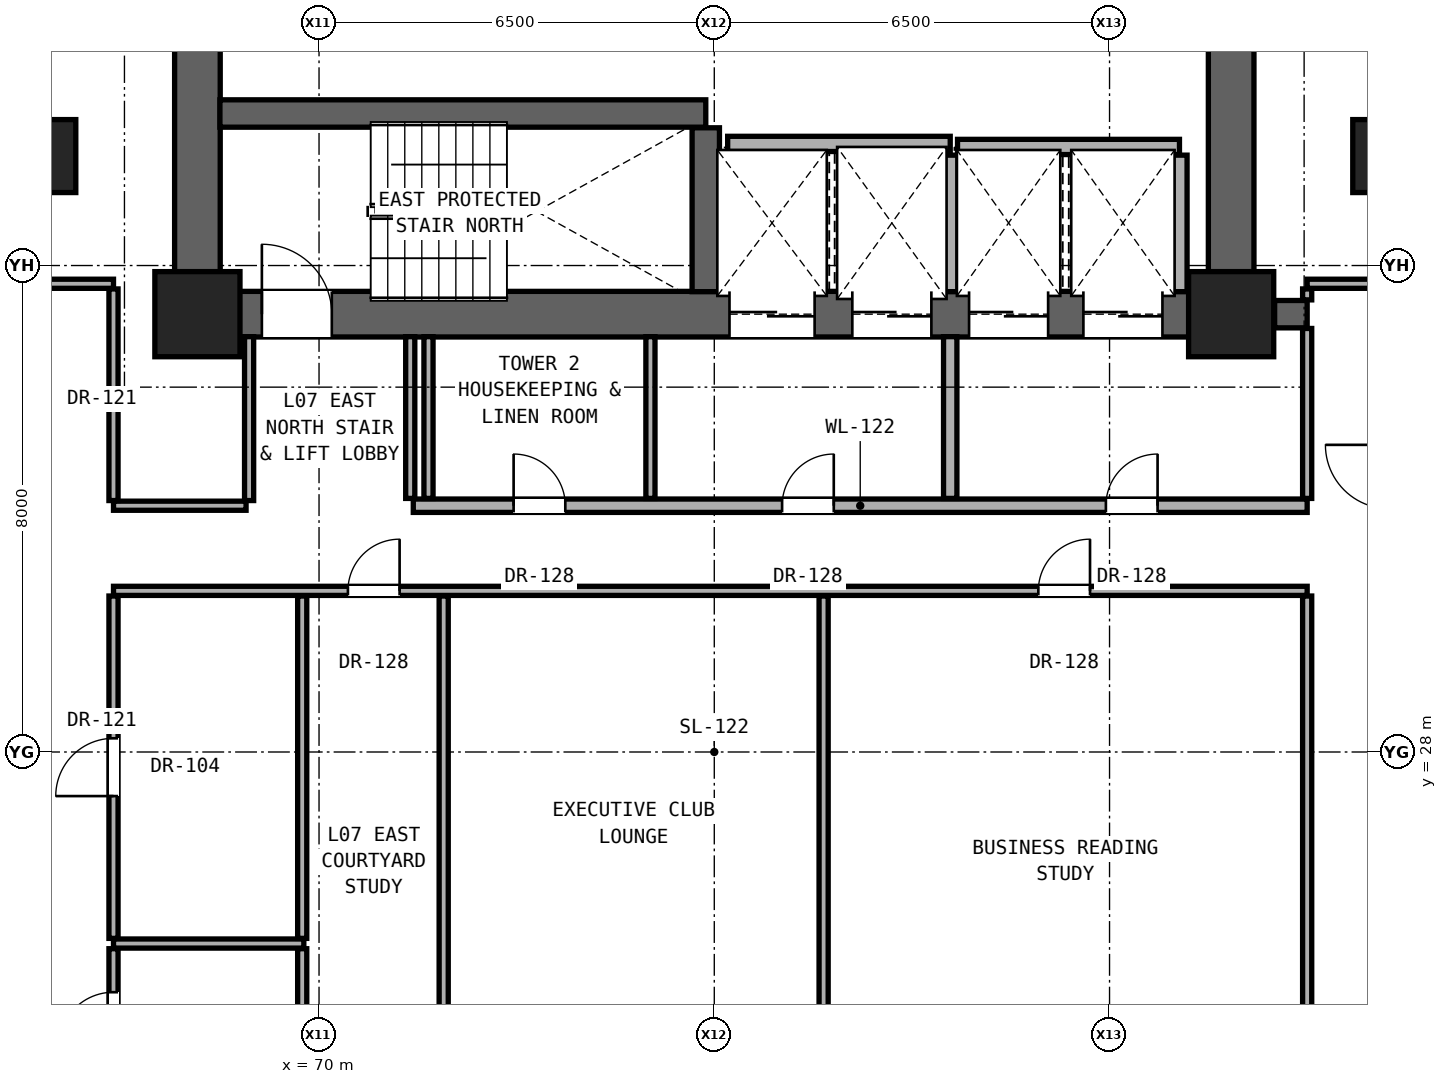
"""IFC4 building model, lengths in metres.
Left out: names, types, materials, properties, quantities, classifications, styles, units other than length and angle.
Written with IfcOpenShell. Run it as: python <this file> out.ifc"""

import sys

from ifc_helpers import new_model, si_unit, direction, frame, frame_2d, origin, origin_2d, place, context, subcontext, project, spatial, rectangle, extrude, element, fill, save


model = new_model("IFC4")
c1 = context("Model", 3, precision=1e-05, world=origin(), true_north=direction((0.0, 1.0)))
c2 = subcontext(c1, "Body", "Model", "MODEL_VIEW")
j1 = project(units=[si_unit("LENGTHUNIT", "METRE"), si_unit("PLANEANGLEUNIT", "RADIAN")], contexts=[c1])
p1 = place(None, origin())
s1 = spatial("IfcSite", under=j1, at=p1, CompositionType="ELEMENT")
p2 = place(p1, origin())
s2 = spatial("IfcBuilding", under=s1, at=p2, CompositionType="ELEMENT")
p3 = place(p2, frame((0.0, 0.0, 29.0)))
s3 = spatial("IfcBuildingStorey", under=s2, at=p3, CompositionType="ELEMENT", Elevation=29.0)
for number, where, z_axis, x_axis in (
    (1, (68.0, 35.2, 0.0), (0.0, 0.0, 1.0), (1.0, 0.0, 0.0)),
    (2, (85.0, 35.2, 0.0), (0.0, 0.0, 1.0), (1.0, 0.0, 0.0)),
):
    element("IfcColumn", number, at=place(p3, frame(where, z_axis=z_axis, x_axis=x_axis)), inside=s3, PredefinedType="COLUMN", context=c2, shape_type="SweptSolid", body=[
        extrude(rectangle(XDim=1.4, YDim=1.4, at=origin_2d()), origin(), (0.0, 0.0, 1.0), 3.3),
    ])
for number, where, z_axis, x_axis in (
    (3, (65.6, 37.8, 0.0), (0.0, 0.0, 1.0), (1.0, 0.0, 0.0)),
    (4, (87.4, 37.8, 0.0), (0.0, 0.0, 1.0), (1.0, 0.0, 0.0)),
):
    element("IfcColumn", number, at=place(p3, frame(where, z_axis=z_axis, x_axis=x_axis)), inside=s3, PredefinedType="PILASTER", context=c2, shape_type="SweptSolid", body=[
        extrude(rectangle(XDim=0.8, YDim=1.2, at=origin_2d()), origin(), (0.0, 0.0, 1.0), 3.3),
    ])
for number, where, z_axis, x_axis in (
    (5, (68.0, 35.2, 0.0), (0.0, 0.0, 1.0), (0.0, 1.0, 0.0)),
    (6, (85.0, 35.2, 0.0), (0.0, 0.0, 1.0), (0.0, 1.0, 0.0)),
):
    element("IfcWall", number, at=place(p3, frame(where, z_axis=z_axis, x_axis=x_axis)), inside=s3, PredefinedType="SHEAR", context=c2, shape_type="SweptSolid", body=[
        extrude(rectangle(XDim=5.6, YDim=0.75, at=frame_2d((2.8, 0.0))), origin(), (0.0, 0.0, 1.0), 3.06),
    ])
p4 = place(p3, frame((68.0, 35.2, 0.0), z_axis=(0.0, 0.0, 1.0), x_axis=(1.0, 0.0, 0.0)))
e7 = element("IfcWall", 7, at=p4, inside=s3, PredefinedType="SHEAR", context=c2, shape_type="SweptSolid", body=[
    extrude(rectangle(XDim=17.0, YDim=0.75, at=frame_2d((8.5, 0.0))), origin(), (0.0, 0.0, 1.0), 3.06),
])
p5 = place(p4, frame((1.06, 0.0, 0.0)))
e8 = element("IfcOpeningElement", 8, at=p5, cuts=e7, PredefinedType="OPENING", context=c2, shape_type="SweptSolid", body=[
    extrude(rectangle(XDim=1.15, YDim=2.2, at=frame_2d((0.575, 1.1))), frame((0.0, 0.385, 0.0), z_axis=(0.0, -1.0, 0.0), x_axis=(1.0, 0.0, 0.0)), (0.0, 0.0, 1.0), 0.77),
])
p6 = place(p4, frame((8.75, 0.0, 0.0)))
e9 = element("IfcOpeningElement", 9, at=p6, cuts=e7, PredefinedType="OPENING", context=c2, shape_type="SweptSolid", body=[
    extrude(rectangle(XDim=1.4, YDim=2.35, at=frame_2d((0.7, 1.175))), frame((0.0, 0.385, 0.0), z_axis=(0.0, -1.0, 0.0), x_axis=(1.0, 0.0, 0.0)), (0.0, 0.0, 1.0), 0.77),
])
p7 = place(p4, frame((10.77, 0.0, 0.0)))
e10 = element("IfcOpeningElement", 10, at=p7, cuts=e7, PredefinedType="OPENING", context=c2, shape_type="SweptSolid", body=[
    extrude(rectangle(XDim=1.3, YDim=2.3, at=frame_2d((0.65, 1.15))), frame((0.0, 0.385, 0.0), z_axis=(0.0, -1.0, 0.0), x_axis=(1.0, 0.0, 0.0)), (0.0, 0.0, 1.0), 0.77),
])
p8 = place(p4, frame((12.69, 0.0, 0.0)))
e11 = element("IfcOpeningElement", 11, at=p8, cuts=e7, PredefinedType="OPENING", context=c2, shape_type="SweptSolid", body=[
    extrude(rectangle(XDim=1.3, YDim=2.3, at=frame_2d((0.65, 1.15))), frame((0.0, 0.385, 0.0), z_axis=(0.0, -1.0, 0.0), x_axis=(1.0, 0.0, 0.0)), (0.0, 0.0, 1.0), 0.77),
])
p9 = place(p4, frame((14.57, 0.0, 0.0)))
e12 = element("IfcOpeningElement", 12, at=p9, cuts=e7, PredefinedType="OPENING", context=c2, shape_type="SweptSolid", body=[
    extrude(rectangle(XDim=1.3, YDim=2.3, at=frame_2d((0.65, 1.15))), frame((0.0, 0.385, 0.0), z_axis=(0.0, -1.0, 0.0), x_axis=(1.0, 0.0, 0.0)), (0.0, 0.0, 1.0), 0.77),
])
p10 = place(p3, frame((66.62, 24.85, 0.0), z_axis=(0.0, 0.0, 1.0), x_axis=(1.0, 0.0, 0.0)))
e13 = element("IfcWall", 13, at=p10, inside=s3, PredefinedType="PARTITIONING", context=c2, shape_type="SweptSolid", body=[
    extrude(rectangle(XDim=3.13, YDim=0.15, at=frame_2d((1.565, 0.0))), origin(), (0.0, 0.0, 1.0), 2.125),
])
p11 = place(p3, frame((66.62, 30.65, 0.0), z_axis=(0.0, 0.0, 1.0), x_axis=(1.0, 0.0, 0.0)))
e14 = element("IfcWall", 14, at=p11, inside=s3, PredefinedType="PARTITIONING", context=c2, shape_type="SweptSolid", body=[
    extrude(rectangle(XDim=19.63, YDim=0.15, at=frame_2d((9.815, 0.0))), origin(), (0.0, 0.0, 1.0), 2.125),
])
p12 = place(p11, frame((3.855, 0.0, 0.0)))
e15 = element("IfcOpeningElement", 15, at=p12, cuts=e14, PredefinedType="OPENING", context=c2, shape_type="SweptSolid", body=[
    extrude(rectangle(XDim=0.85, YDim=2.01, at=frame_2d((0.425, 1.005))), frame((0.0, 0.085, 0.0), z_axis=(0.0, -1.0, 0.0), x_axis=(1.0, 0.0, 0.0)), (0.0, 0.0, 1.0), 0.17),
])
p13 = place(p11, frame((15.209, 0.0, 0.0)))
e16 = element("IfcOpeningElement", 16, at=p13, cuts=e14, PredefinedType="OPENING", context=c2, shape_type="SweptSolid", body=[
    extrude(rectangle(XDim=0.85, YDim=2.01, at=frame_2d((0.425, 1.005))), frame((0.0, 0.085, 0.0), z_axis=(0.0, -1.0, 0.0), x_axis=(1.0, 0.0, 0.0)), (0.0, 0.0, 1.0), 0.17),
])
p14 = place(p3, frame((66.62, 32.05, 0.0), z_axis=(0.0, 0.0, 1.0), x_axis=(1.0, 0.0, 0.0)))
e17 = element("IfcWall", 17, at=p14, inside=s3, PredefinedType="PARTITIONING", context=c2, shape_type="SweptSolid", body=[
    extrude(rectangle(XDim=2.18, YDim=0.15, at=frame_2d((1.09, 0.0))), origin(), (0.0, 0.0, 1.0), 2.125),
])
p15 = place(p3, frame((71.55, 32.05, 0.0), z_axis=(0.0, 0.0, 1.0), x_axis=(1.0, 0.0, 0.0)))
e18 = element("IfcWall", 18, at=p15, inside=s3, PredefinedType="SOLIDWALL", context=c2, shape_type="SweptSolid", body=[
    extrude(rectangle(XDim=14.7, YDim=0.22, at=frame_2d((7.35, 0.0))), origin(), (0.0, 0.0, 1.0), 2.125),
])
p16 = place(p15, frame((11.39, 0.0, 0.0)))
e19 = element("IfcOpeningElement", 19, at=p16, cuts=e18, PredefinedType="OPENING", context=c2, shape_type="SweptSolid", body=[
    extrude(rectangle(XDim=0.85, YDim=2.01, at=frame_2d((0.425, 1.005))), frame((0.0, 0.12, 0.0), z_axis=(0.0, -1.0, 0.0), x_axis=(1.0, 0.0, 0.0)), (0.0, 0.0, 1.0), 0.24),
])
p17 = place(p15, frame((6.065, 0.0, 0.0)))
e20 = element("IfcOpeningElement", 20, at=p17, cuts=e18, PredefinedType="OPENING", context=c2, shape_type="SweptSolid", body=[
    extrude(rectangle(XDim=0.85, YDim=2.01, at=frame_2d((0.425, 1.005))), frame((0.0, 0.12, 0.0), z_axis=(0.0, -1.0, 0.0), x_axis=(1.0, 0.0, 0.0)), (0.0, 0.0, 1.0), 0.24),
])
p18 = place(p15, frame((1.65, 0.0, 0.0)))
e21 = element("IfcOpeningElement", 21, at=p18, cuts=e18, PredefinedType="OPENING", context=c2, shape_type="SweptSolid", body=[
    extrude(rectangle(XDim=0.85, YDim=2.01, at=frame_2d((0.425, 1.005))), frame((0.0, 0.12, 0.0), z_axis=(0.0, -1.0, 0.0), x_axis=(1.0, 0.0, 0.0)), (0.0, 0.0, 1.0), 0.24),
])
p19 = place(p3, frame((85.715, 35.2, 0.0), z_axis=(0.0, 0.0, 1.0), x_axis=(1.0, 0.0, 0.0)))
e22 = element("IfcWall", 22, at=p19, inside=s3, PredefinedType="SHEAR", context=c2, shape_type="SweptSolid", body=[
    extrude(rectangle(XDim=0.535, YDim=0.45, at=frame_2d((0.268, 0.0))), origin(), (0.0, 0.0, 1.0), 3.06),
])
p20 = place(p3, frame((65.25, 35.7, 0.0), z_axis=(0.0, 0.0, 1.0), x_axis=(1.0, 0.0, 0.0)))
e23 = element("IfcWall", 23, at=p20, inside=s3, PredefinedType="PARTITIONING", context=c2, shape_type="SweptSolid", body=[
    extrude(rectangle(XDim=1.37, YDim=0.15, at=frame_2d((0.685, 0.0))), origin(), (0.0, 0.0, 1.0), 3.06),
])
p21 = place(p3, frame((86.25, 35.7, 0.0), z_axis=(0.0, 0.0, 1.0), x_axis=(1.0, 0.0, 0.0)))
e24 = element("IfcWall", 24, at=p21, inside=s3, PredefinedType="PARTITIONING", context=c2, shape_type="SweptSolid", body=[
    extrude(rectangle(XDim=1.35, YDim=0.15, at=frame_2d((0.675, 0.0))), origin(), (0.0, 0.0, 1.0), 3.06),
])
p22 = place(p3, frame((80.5, 37.95, 0.0), z_axis=(0.0, 0.0, 1.0), x_axis=(1.0, 0.0, 0.0)))
e25 = element("IfcWall", 25, at=p22, inside=s3, PredefinedType="SOLIDWALL", context=c2, shape_type="SweptSolid", body=[
    extrude(rectangle(XDim=3.65, YDim=0.25, at=frame_2d((1.825, 0.0))), origin(), (0.0, 0.0, 1.0), 3.06),
])
p23 = place(p3, frame((76.72, 38.0, 0.0), z_axis=(0.0, 0.0, 1.0), x_axis=(1.0, 0.0, 0.0)))
e26 = element("IfcWall", 26, at=p23, inside=s3, PredefinedType="SOLIDWALL", context=c2, shape_type="SweptSolid", body=[
    extrude(rectangle(XDim=3.66, YDim=0.25, at=frame_2d((1.83, 0.0))), origin(), (0.0, 0.0, 1.0), 3.06),
])
p24 = place(p3, frame((68.37, 38.5, 0.0), z_axis=(0.0, 0.0, 1.0), x_axis=(1.0, 0.0, 0.0)))
e27 = element("IfcWall", 27, at=p24, inside=s3, PredefinedType="SHEAR", context=c2, shape_type="SweptSolid", body=[
    extrude(rectangle(XDim=7.99, YDim=0.45, at=frame_2d((3.995, 0.0))), origin(), (0.0, 0.0, 1.0), 3.06),
])
p25 = place(p3, frame((66.62, 22.435, 0.0), z_axis=(0.0, 0.0, 1.0), x_axis=(0.0, 1.0, 0.0)))
e28 = element("IfcWall", 28, at=p25, inside=s3, PredefinedType="PARTITIONING", context=c2, shape_type="SweptSolid", body=[
    extrude(rectangle(XDim=2.33, YDim=0.15, at=frame_2d((1.165, 0.0))), origin(), (0.0, 0.0, 1.0), 3.06),
])
p26 = place(p25, frame((0.715, 0.0, 0.0)))
e29 = element("IfcOpeningElement", 29, at=p26, cuts=e28, PredefinedType="OPENING", context=c2, shape_type="SweptSolid", body=[
    extrude(rectangle(XDim=0.9, YDim=2.1, at=frame_2d((0.45, 1.05))), frame((0.0, 0.085, 0.0), z_axis=(0.0, -1.0, 0.0), x_axis=(1.0, 0.0, 0.0)), (0.0, 0.0, 1.0), 0.17),
])
p27 = place(p3, frame((66.62, 24.935, 0.0), z_axis=(0.0, 0.0, 1.0), x_axis=(0.0, 1.0, 0.0)))
e30 = element("IfcWall", 30, at=p27, inside=s3, PredefinedType="PARTITIONING", context=c2, shape_type="SweptSolid", body=[
    extrude(rectangle(XDim=5.63, YDim=0.15, at=frame_2d((2.815, 0.0))), origin(), (0.0, 0.0, 1.0), 2.279),
])
p28 = place(p27, frame((2.34, 0.0, 0.0)))
e31 = element("IfcOpeningElement", 31, at=p28, cuts=e30, PredefinedType="OPENING", context=c2, shape_type="SweptSolid", body=[
    extrude(rectangle(XDim=0.95, YDim=2.15, at=frame_2d((0.475, 1.075))), frame((0.0, 0.085, 0.0), z_axis=(0.0, -1.0, 0.0), x_axis=(1.0, 0.0, 0.0)), (0.0, 0.0, 1.0), 0.17),
])
p29 = place(p3, frame((66.62, 32.135, 0.0), z_axis=(0.0, 0.0, 1.0), x_axis=(0.0, 1.0, 0.0)))
e32 = element("IfcWall", 32, at=p29, inside=s3, PredefinedType="PARTITIONING", context=c2, shape_type="SweptSolid", body=[
    extrude(rectangle(XDim=3.48, YDim=0.15, at=frame_2d((1.74, 0.0))), origin(), (0.0, 0.0, 1.0), 2.452),
])
p30 = place(p3, frame((68.85, 32.135, 0.0), z_axis=(0.0, 0.0, 1.0), x_axis=(0.0, 1.0, 0.0)))
e33 = element("IfcWall", 33, at=p30, inside=s3, PredefinedType="PARTITIONING", context=c2, shape_type="SweptSolid", body=[
    extrude(rectangle(XDim=2.695, YDim=0.15, at=frame_2d((1.348, 0.0))), origin(), (0.0, 0.0, 1.0), 3.06),
])
p31 = place(p3, frame((69.723, 22.435, 0.0), z_axis=(0.0, 0.0, 1.0), x_axis=(0.0, 1.0, 0.0)))
e34 = element("IfcWall", 34, at=p31, inside=s3, PredefinedType="PARTITIONING", context=c2, shape_type="SweptSolid", body=[
    extrude(rectangle(XDim=2.33, YDim=0.15, at=frame_2d((1.165, 0.0))), origin(), (0.0, 0.0, 1.0), 3.06),
])
p32 = place(p3, frame((69.723, 24.935, 0.0), z_axis=(0.0, 0.0, 1.0), x_axis=(0.0, 1.0, 0.0)))
e35 = element("IfcWall", 35, at=p32, inside=s3, PredefinedType="PARTITIONING", context=c2, shape_type="SweptSolid", body=[
    extrude(rectangle(XDim=5.63, YDim=0.15, at=frame_2d((2.815, 0.0))), origin(), (0.0, 0.0, 1.0), 2.125),
])
for number, where, z_axis, x_axis in (
    (36, (71.5, 32.17, 0.0), (0.0, 0.0, 1.0), (0.0, 1.0, 0.0)),
    (37, (71.8, 32.17, 0.0), (0.0, 0.0, 1.0), (0.0, 1.0, 0.0)),
):
    element("IfcWall", number, at=place(p3, frame(where, z_axis=z_axis, x_axis=x_axis)), inside=s3, PredefinedType="PARTITIONING", context=c2, shape_type="SweptSolid", body=[
        extrude(rectangle(XDim=2.66, YDim=0.15, at=frame_2d((1.33, 0.0))), origin(), (0.0, 0.0, 1.0), 3.06),
    ])
p33 = place(p3, frame((72.05, 22.435, 0.0), z_axis=(0.0, 0.0, 1.0), x_axis=(0.0, 1.0, 0.0)))
e38 = element("IfcWall", 38, at=p33, inside=s3, PredefinedType="PARTITIONING", context=c2, shape_type="SweptSolid", body=[
    extrude(rectangle(XDim=8.13, YDim=0.15, at=frame_2d((4.065, 0.0))), origin(), (0.0, 0.0, 1.0), 2.125),
])
p34 = place(p3, frame((75.45, 32.17, 0.0), z_axis=(0.0, 0.0, 1.0), x_axis=(0.0, 1.0, 0.0)))
e39 = element("IfcWall", 39, at=p34, inside=s3, PredefinedType="PARTITIONING", context=c2, shape_type="SweptSolid", body=[
    extrude(rectangle(XDim=2.66, YDim=0.15, at=frame_2d((1.33, 0.0))), origin(), (0.0, 0.0, 1.0), 3.06),
])
p35 = place(p3, frame((76.36, 35.57, 0.0), z_axis=(0.0, 0.0, 1.0), x_axis=(0.0, 1.0, 0.0)))
e40 = element("IfcWall", 40, at=p35, inside=s3, PredefinedType="SHEAR", context=c2, shape_type="SweptSolid", body=[
    extrude(rectangle(XDim=2.695, YDim=0.45, at=frame_2d((1.347, 0.0))), origin(), (0.0, 0.0, 1.0), 3.06),
])
p36 = place(p3, frame((78.298, 22.435, 0.0), z_axis=(0.0, 0.0, 1.0), x_axis=(0.0, 1.0, 0.0)))
e41 = element("IfcWall", 41, at=p36, inside=s3, PredefinedType="PARTITIONING", context=c2, shape_type="SweptSolid", body=[
    extrude(rectangle(XDim=8.13, YDim=0.15, at=frame_2d((4.065, 0.0))), origin(), (0.0, 0.0, 1.0), 2.125),
])
p37 = place(p3, frame((80.38, 32.17, 0.0), z_axis=(0.0, 0.0, 1.0), x_axis=(0.0, 1.0, 0.0)))
e42 = element("IfcWall", 42, at=p37, inside=s3, PredefinedType="SOLIDWALL", context=c2, shape_type="SweptSolid", body=[
    extrude(rectangle(XDim=2.66, YDim=0.22, at=frame_2d((1.33, 0.0))), origin(), (0.0, 0.0, 1.0), 3.06),
])
for number, where, z_axis, x_axis in (
    (43, (80.38, 35.57, 0.0), (0.0, 0.0, 1.0), (0.0, 1.0, 0.0)),
    (44, (84.15, 35.57, 0.0), (0.0, 0.0, 1.0), (0.0, 1.0, 0.0)),
):
    element("IfcWall", number, at=place(p3, frame(where, z_axis=z_axis, x_axis=x_axis)), inside=s3, PredefinedType="SOLIDWALL", context=c2, shape_type="SweptSolid", body=[
        extrude(rectangle(XDim=2.245, YDim=0.25, at=frame_2d((1.123, 0.0))), origin(), (0.0, 0.0, 1.0), 3.06),
    ])
p38 = place(p3, frame((86.25, 22.435, 0.0), z_axis=(0.0, 0.0, 1.0), x_axis=(0.0, 1.0, 0.0)))
e45 = element("IfcWall", 45, at=p38, inside=s3, PredefinedType="PARTITIONING", context=c2, shape_type="SweptSolid", body=[
    extrude(rectangle(XDim=8.13, YDim=0.15, at=frame_2d((4.065, 0.0))), origin(), (0.0, 0.0, 1.0), 2.279),
])
p39 = place(p3, frame((86.25, 32.17, 0.0), z_axis=(0.0, 0.0, 1.0), x_axis=(0.0, 1.0, 0.0)))
e46 = element("IfcWall", 46, at=p39, inside=s3, PredefinedType="PARTITIONING", context=c2, shape_type="SweptSolid", body=[
    extrude(rectangle(XDim=2.795, YDim=0.15, at=frame_2d((1.397, 0.0))), origin(), (0.0, 0.0, 1.0), 2.452),
])
p40 = place(p3, frame((86.25, 35.435, 0.0), z_axis=(0.0, 0.0, 1.0), x_axis=(0.0, 1.0, 0.0)))
e47 = element("IfcWall", 47, at=p40, inside=s3, PredefinedType="PARTITIONING", context=c2, shape_type="SweptSolid", body=[
    extrude(rectangle(XDim=0.18, YDim=0.15, at=frame_2d((0.09, 0.0))), origin(), (0.0, 0.0, 1.0), 2.452),
])
p41 = place(p16, origin())
e48 = element("IfcDoor", 48, at=p41, inside=s3, OperationType="SINGLE_SWING_RIGHT", PredefinedType="DOOR", context=c2, shape_type="SweptSolid", body=[
    extrude(rectangle(XDim=0.85, YDim=2.01, at=frame_2d((0.425, 1.005))), frame((0.0, 0.025, 0.0), z_axis=(0.0, -1.0, 0.0), x_axis=(1.0, 0.0, 0.0)), (0.0, 0.0, 1.0), 0.05),
])
fill(e19, e48)
p42 = place(p5, origin())
e49 = element("IfcDoor", 49, at=p42, inside=s3, OperationType="SINGLE_SWING_LEFT", PredefinedType="DOOR", context=c2, shape_type="SweptSolid", body=[
    extrude(rectangle(XDim=1.15, YDim=2.2, at=frame_2d((0.575, 1.1))), frame((0.0, 0.025, 0.0), z_axis=(0.0, -1.0, 0.0), x_axis=(1.0, 0.0, 0.0)), (0.0, 0.0, 1.0), 0.05),
])
fill(e8, e49)
p43 = place(p17, origin())
e50 = element("IfcDoor", 50, at=p43, inside=s3, OperationType="SINGLE_SWING_RIGHT", PredefinedType="DOOR", context=c2, shape_type="SweptSolid", body=[
    extrude(rectangle(XDim=0.85, YDim=2.01, at=frame_2d((0.425, 1.005))), frame((0.0, 0.025, 0.0), z_axis=(0.0, -1.0, 0.0), x_axis=(1.0, 0.0, 0.0)), (0.0, 0.0, 1.0), 0.05),
])
fill(e20, e50)
p44 = place(p18, origin())
e51 = element("IfcDoor", 51, at=p44, inside=s3, OperationType="SINGLE_SWING_LEFT", PredefinedType="DOOR", context=c2, shape_type="SweptSolid", body=[
    extrude(rectangle(XDim=0.85, YDim=2.01, at=frame_2d((0.425, 1.005))), frame((0.0, 0.025, 0.0), z_axis=(0.0, -1.0, 0.0), x_axis=(1.0, 0.0, 0.0)), (0.0, 0.0, 1.0), 0.05),
])
fill(e21, e51)
p45 = place(p26, origin())
e52 = element("IfcDoor", 52, at=p45, inside=s3, OperationType="SINGLE_SWING_LEFT", PredefinedType="DOOR", context=c2, shape_type="SweptSolid", body=[
    extrude(rectangle(XDim=0.9, YDim=2.1, at=frame_2d((0.45, 1.05))), frame((0.0, 0.025, 0.0), z_axis=(0.0, -1.0, 0.0), x_axis=(1.0, 0.0, 0.0)), (0.0, 0.0, 1.0), 0.05),
])
fill(e29, e52)
p46 = place(p28, origin())
e53 = element("IfcDoor", 53, at=p46, inside=s3, OperationType="SINGLE_SWING_LEFT", PredefinedType="DOOR", context=c2, shape_type="SweptSolid", body=[
    extrude(rectangle(XDim=0.95, YDim=2.15, at=frame_2d((0.475, 1.075))), frame((0.0, 0.025, 0.0), z_axis=(0.0, -1.0, 0.0), x_axis=(1.0, 0.0, 0.0)), (0.0, 0.0, 1.0), 0.05),
])
fill(e31, e53)
p47 = place(p12, origin())
e54 = element("IfcDoor", 54, at=p47, inside=s3, OperationType="SINGLE_SWING_RIGHT", PredefinedType="DOOR", context=c2, shape_type="SweptSolid", body=[
    extrude(rectangle(XDim=0.85, YDim=2.01, at=frame_2d((0.425, 1.005))), frame((0.0, 0.025, 0.0), z_axis=(0.0, -1.0, 0.0), x_axis=(1.0, 0.0, 0.0)), (0.0, 0.0, 1.0), 0.05),
])
fill(e15, e54)
p48 = place(p13, origin())
e55 = element("IfcDoor", 55, at=p48, inside=s3, OperationType="SINGLE_SWING_RIGHT", PredefinedType="DOOR", context=c2, shape_type="SweptSolid", body=[
    extrude(rectangle(XDim=0.85, YDim=2.01, at=frame_2d((0.425, 1.005))), frame((0.0, 0.025, 0.0), z_axis=(0.0, -1.0, 0.0), x_axis=(1.0, 0.0, 0.0)), (0.0, 0.0, 1.0), 0.05),
])
fill(e16, e55)
p49 = place(p6, origin())
e56 = element("IfcDoor", 56, at=p49, inside=s3, OperationType="DOUBLE_DOOR_SLIDING", PredefinedType="DOOR", context=c2, shape_type="SweptSolid", body=[
    extrude(rectangle(XDim=1.4, YDim=2.35, at=frame_2d((0.7, 1.175))), frame((0.0, 0.025, 0.0), z_axis=(0.0, -1.0, 0.0), x_axis=(1.0, 0.0, 0.0)), (0.0, 0.0, 1.0), 0.05),
])
fill(e9, e56)
p50 = place(p7, origin())
e57 = element("IfcDoor", 57, at=p50, inside=s3, OperationType="DOUBLE_DOOR_SLIDING", PredefinedType="DOOR", context=c2, shape_type="SweptSolid", body=[
    extrude(rectangle(XDim=1.3, YDim=2.3, at=frame_2d((0.65, 1.15))), frame((0.0, 0.025, 0.0), z_axis=(0.0, -1.0, 0.0), x_axis=(1.0, 0.0, 0.0)), (0.0, 0.0, 1.0), 0.05),
])
fill(e10, e57)
p51 = place(p8, origin())
e58 = element("IfcDoor", 58, at=p51, inside=s3, OperationType="DOUBLE_DOOR_SLIDING", PredefinedType="DOOR", context=c2, shape_type="SweptSolid", body=[
    extrude(rectangle(XDim=1.3, YDim=2.3, at=frame_2d((0.65, 1.15))), frame((0.0, 0.025, 0.0), z_axis=(0.0, -1.0, 0.0), x_axis=(1.0, 0.0, 0.0)), (0.0, 0.0, 1.0), 0.05),
])
fill(e11, e58)
p52 = place(p9, origin())
e59 = element("IfcDoor", 59, at=p52, inside=s3, OperationType="DOUBLE_DOOR_SLIDING", PredefinedType="DOOR", context=c2, shape_type="SweptSolid", body=[
    extrude(rectangle(XDim=1.3, YDim=2.3, at=frame_2d((0.65, 1.15))), frame((0.0, 0.025, 0.0), z_axis=(0.0, -1.0, 0.0), x_axis=(1.0, 0.0, 0.0)), (0.0, 0.0, 1.0), 0.05),
])
fill(e12, e59)
save(model, sys.argv[1])
